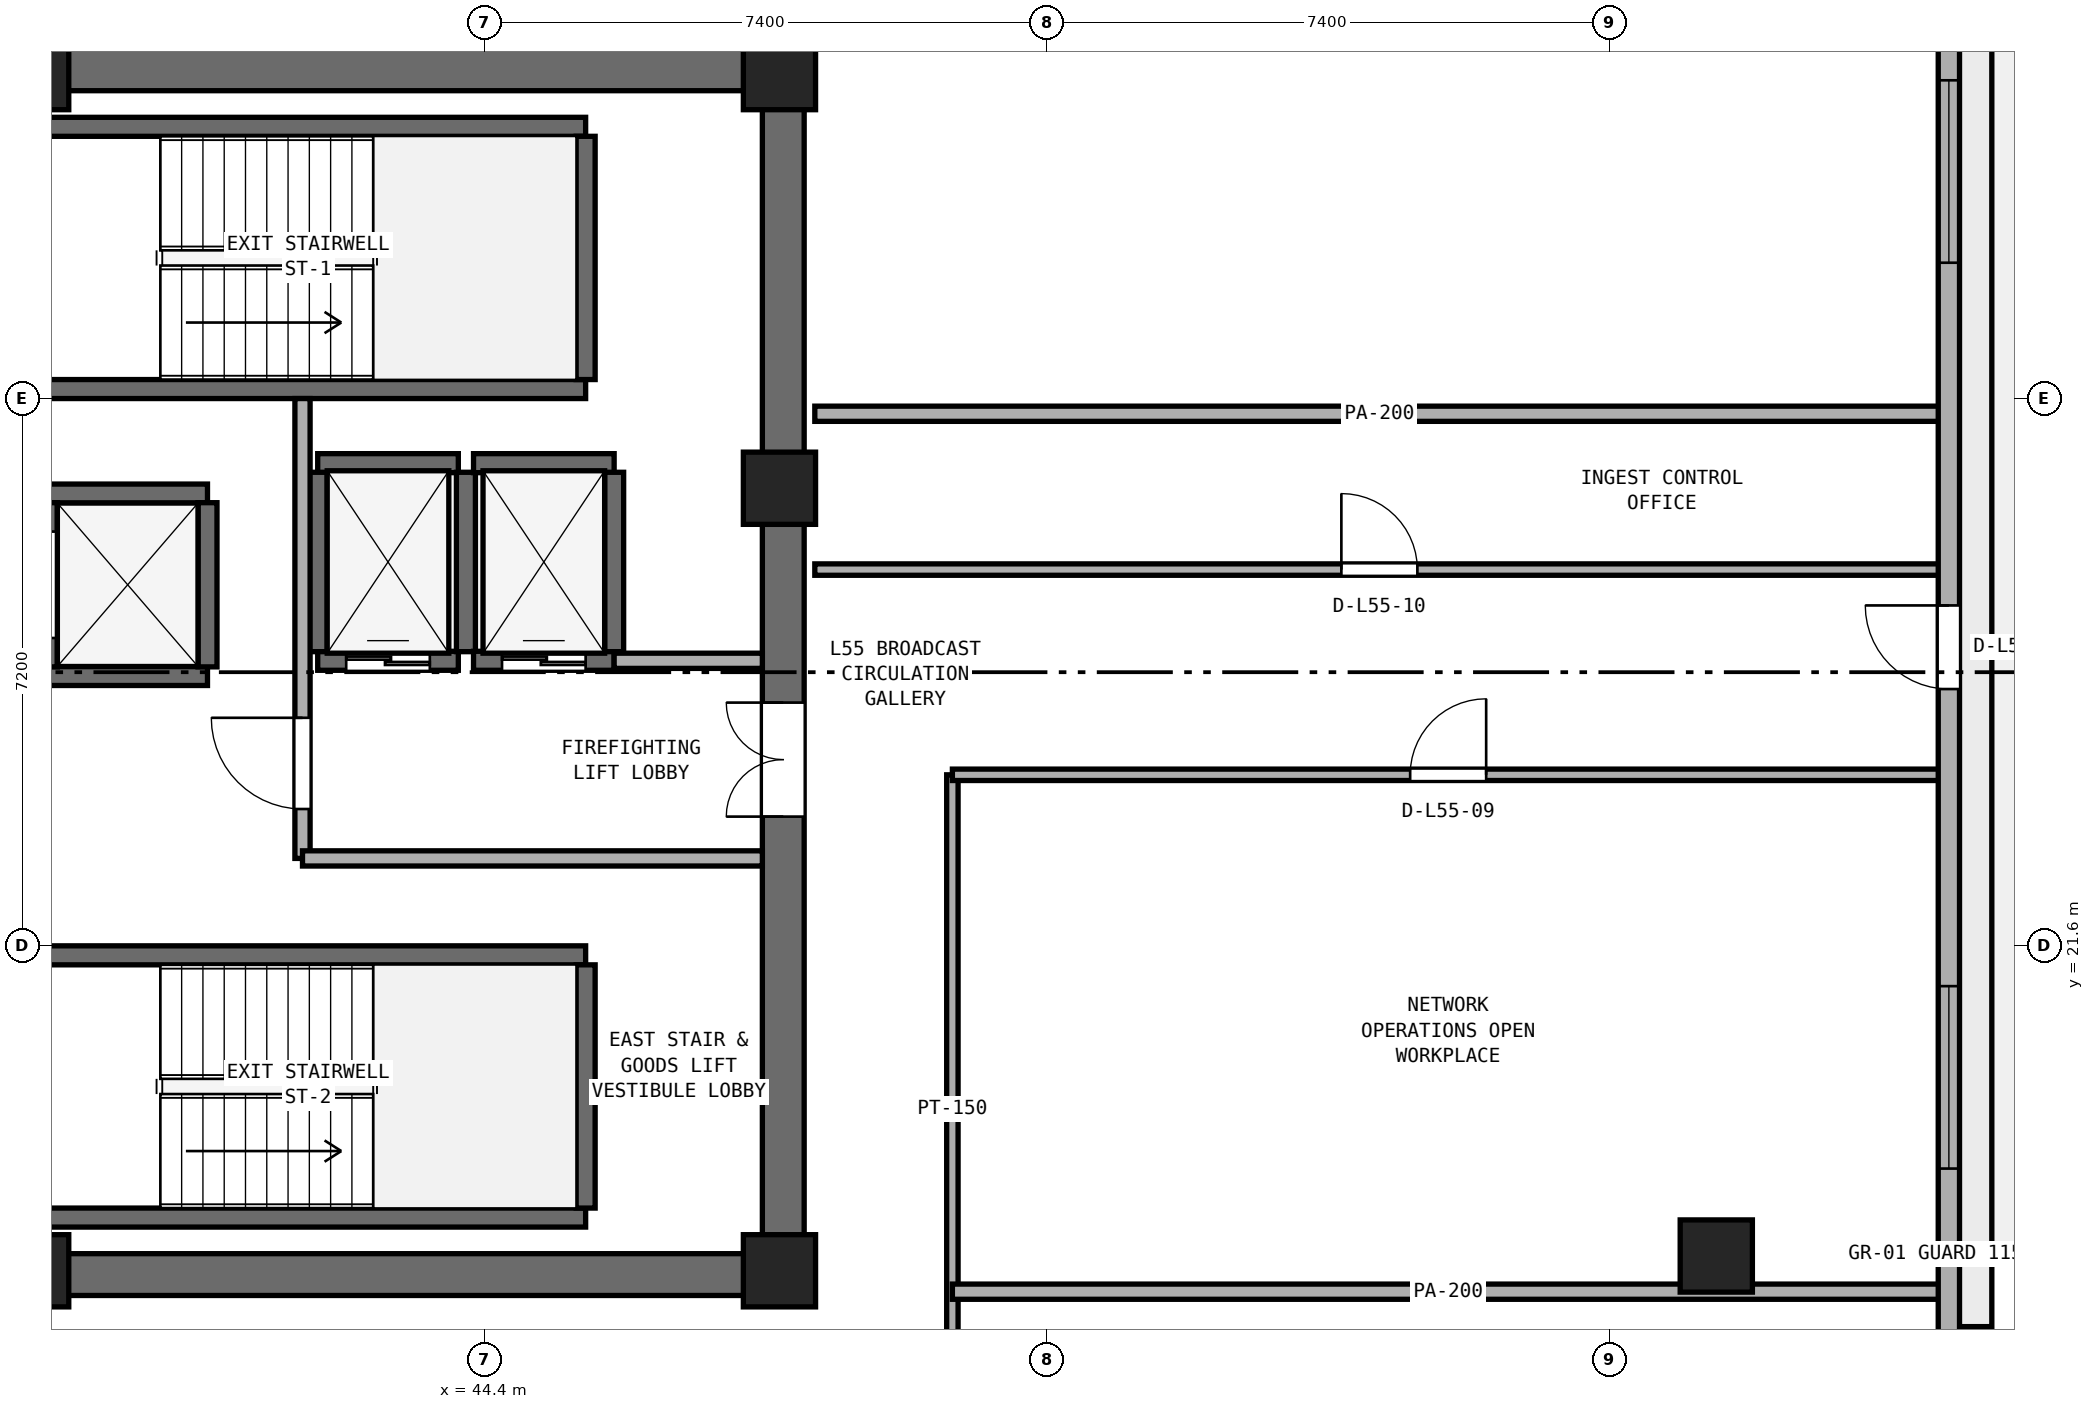
"""IFC4 building model, lengths in metres.
Left out: names, types, materials, properties, quantities, classifications, styles, units other than length and angle.
Written with IfcOpenShell. Run it as: python <this file> out.ifc"""

import sys

from ifc_helpers import new_model, si_unit, direction, frame, frame_2d, origin, origin_2d, place, context, subcontext, project, spatial, rectangle, extrude, element, fill, save


model = new_model("IFC4")
c1 = context("Model", 3, precision=1e-05, world=origin(), true_north=direction((0.0, 1.0)))
c2 = subcontext(c1, "Body", "Model", "MODEL_VIEW")
j1 = project(units=[si_unit("LENGTHUNIT", "METRE"), si_unit("PLANEANGLEUNIT", "RADIAN")], contexts=[c1])
p1 = place(None, origin())
s1 = spatial("IfcSite", under=j1, at=p1, CompositionType="ELEMENT")
p2 = place(p1, origin())
s2 = spatial("IfcBuilding", under=s1, at=p2, CompositionType="ELEMENT")
p3 = place(p2, frame((0.0, 0.0, 216.2)))
s3 = spatial("IfcBuildingStorey", under=s2, at=p3, CompositionType="ELEMENT", Elevation=216.2)
for number, where, z_axis, x_axis in (
    (1, (25.4, 17.275, 0.0), (0.0, 0.0, 1.0), (1.0, 0.0, 0.0)),
    (2, (25.4, 33.125, 0.0), (0.0, 0.0, 1.0), (1.0, 0.0, 0.0)),
):
    element("IfcWall", number, at=place(p3, frame(where, z_axis=z_axis, x_axis=x_axis)), inside=s3, PredefinedType="SHEAR", context=c2, shape_type="SweptSolid", body=[
        extrude(rectangle(XDim=23.2, YDim=0.55, at=frame_2d((11.6, 0.0))), origin(), (0.0, 0.0, 1.0), 3.4),
    ])
p4 = place(p3, frame((48.325, 17.55, 0.0), z_axis=(0.0, 0.0, 1.0), x_axis=(0.0, 1.0, 0.0)))
e3 = element("IfcWall", 3, at=p4, inside=s3, PredefinedType="SHEAR", context=c2, shape_type="SweptSolid", body=[
    extrude(rectangle(XDim=15.3, YDim=0.55, at=frame_2d((7.65, 0.0))), origin(), (0.0, 0.0, 1.0), 3.4),
])
p5 = place(p4, frame((5.75, 0.0, 0.0)))
e4 = element("IfcOpeningElement", 4, at=p5, cuts=e3, PredefinedType="OPENING", context=c2, shape_type="SweptSolid", body=[
    extrude(rectangle(XDim=1.5, YDim=2.15, at=frame_2d((0.75, 1.075))), frame((0.0, 0.285, 0.0), z_axis=(0.0, -1.0, 0.0), x_axis=(1.0, 0.0, 0.0)), (0.0, 0.0, 1.0), 0.57),
])
for number, where, z_axis, x_axis in (
    (5, (38.45, 17.325, 0.0), (0.0, 0.0, 1.0), (1.0, 0.0, 0.0)),
    (6, (48.275, 17.325, 0.0), (0.0, 0.0, 1.0), (1.0, 0.0, 0.0)),
    (7, (48.275, 27.62, 0.0), (0.0, 0.0, 1.0), (1.0, 0.0, 0.0)),
    (8, (48.275, 33.075, 0.0), (0.0, 0.0, 1.0), (1.0, 0.0, 0.0)),
    (9, (38.45, 33.075, 0.0), (0.0, 0.0, 1.0), (1.0, 0.0, 0.0)),
):
    element("IfcColumn", number, at=place(p3, frame(where, z_axis=z_axis, x_axis=x_axis)), inside=s3, PredefinedType="PILASTER", context=c2, shape_type="SweptSolid", body=[
        extrude(rectangle(XDim=0.95, YDim=0.95, at=origin_2d()), origin(), (0.0, 0.0, 1.0), 3.8),
    ])
p6 = place(p3, frame((60.6, 17.519, 0.0), z_axis=(0.0, 0.0, 1.0), x_axis=(1.0, 0.0, 0.0)))
e10 = element("IfcColumn", 10, at=p6, inside=s3, PredefinedType="COLUMN", context=c2, shape_type="SweptSolid", body=[
    extrude(rectangle(XDim=0.95, YDim=0.95, at=origin_2d()), origin(), (0.0, 0.0, 1.0), 3.8),
])
for number, where, z_axis, x_axis in (
    (11, (38.425, 28.925, 0.0), (0.0, 0.0, 1.0), (1.0, 0.0, 0.0)),
    (12, (38.425, 32.375, 0.0), (0.0, 0.0, 1.0), (1.0, 0.0, 0.0)),
):
    element("IfcWall", number, at=place(p3, frame(where, z_axis=z_axis, x_axis=x_axis)), inside=s3, PredefinedType="SHEAR", context=c2, shape_type="SweptSolid", body=[
        extrude(rectangle(XDim=7.3, YDim=0.25, at=frame_2d((3.65, 0.0))), origin(), (0.0, 0.0, 1.0), 3.4),
    ])
p7 = place(p3, frame((45.725, 29.05, 0.0), z_axis=(0.0, 0.0, 1.0), x_axis=(0.0, 1.0, 0.0)))
e13 = element("IfcWall", 13, at=p7, inside=s3, PredefinedType="SHEAR", context=c2, shape_type="SweptSolid", body=[
    extrude(rectangle(XDim=3.2, YDim=0.25, at=frame_2d((1.6, 0.0))), origin(), (0.0, 0.0, 1.0), 3.4),
])
for number, where, z_axis, x_axis in (
    (14, (38.425, 18.025, 0.0), (0.0, 0.0, 1.0), (1.0, 0.0, 0.0)),
    (15, (38.425, 21.475, 0.0), (0.0, 0.0, 1.0), (1.0, 0.0, 0.0)),
):
    element("IfcWall", number, at=place(p3, frame(where, z_axis=z_axis, x_axis=x_axis)), inside=s3, PredefinedType="SHEAR", context=c2, shape_type="SweptSolid", body=[
        extrude(rectangle(XDim=7.3, YDim=0.25, at=frame_2d((3.65, 0.0))), origin(), (0.0, 0.0, 1.0), 3.4),
    ])
p8 = place(p3, frame((45.725, 18.15, 0.0), z_axis=(0.0, 0.0, 1.0), x_axis=(0.0, 1.0, 0.0)))
e16 = element("IfcWall", 16, at=p8, inside=s3, PredefinedType="SHEAR", context=c2, shape_type="SweptSolid", body=[
    extrude(rectangle(XDim=3.2, YDim=0.25, at=frame_2d((1.6, 0.0))), origin(), (0.0, 0.0, 1.0), 3.4),
])
p9 = place(p3, frame((42.2, 25.35, 0.0), z_axis=(0.0, 0.0, 1.0), x_axis=(1.0, 0.0, 0.0)))
e17 = element("IfcWall", 17, at=p9, inside=s3, PredefinedType="SHEAR", context=c2, shape_type="SweptSolid", body=[
    extrude(rectangle(XDim=1.85, YDim=0.25, at=frame_2d((0.925, 0.0))), origin(), (0.0, 0.0, 1.0), 3.4),
])
p10 = place(p9, frame((0.375, 0.0, 0.0)))
e18 = element("IfcOpeningElement", 18, at=p10, cuts=e17, PredefinedType="OPENING", context=c2, shape_type="SweptSolid", body=[
    extrude(rectangle(XDim=1.1, YDim=2.15, at=frame_2d((0.55, 1.075))), frame((0.0, 0.135, 0.0), z_axis=(0.0, -1.0, 0.0), x_axis=(1.0, 0.0, 0.0)), (0.0, 0.0, 1.0), 0.27),
])
p11 = place(p3, frame((42.2, 27.95, 0.0), z_axis=(0.0, 0.0, 1.0), x_axis=(1.0, 0.0, 0.0)))
e19 = element("IfcWall", 19, at=p11, inside=s3, PredefinedType="SHEAR", context=c2, shape_type="SweptSolid", body=[
    extrude(rectangle(XDim=1.85, YDim=0.25, at=frame_2d((0.925, 0.0))), origin(), (0.0, 0.0, 1.0), 3.4),
])
for number, where, z_axis, x_axis in (
    (20, (42.2, 25.47, 0.0), (0.0, 0.0, 1.0), (0.0, 1.0, 0.0)),
    (21, (44.15, 25.47, 0.0), (0.0, 0.0, 1.0), (0.0, 1.0, 0.0)),
):
    element("IfcWall", number, at=place(p3, frame(where, z_axis=z_axis, x_axis=x_axis)), inside=s3, PredefinedType="SHEAR", context=c2, shape_type="SweptSolid", body=[
        extrude(rectangle(XDim=2.36, YDim=0.25, at=frame_2d((1.18, 0.0))), origin(), (0.0, 0.0, 1.0), 3.4),
    ])
p12 = place(p3, frame((44.25, 25.35, 0.0), z_axis=(0.0, 0.0, 1.0), x_axis=(1.0, 0.0, 0.0)))
e22 = element("IfcWall", 22, at=p12, inside=s3, PredefinedType="SHEAR", context=c2, shape_type="SweptSolid", body=[
    extrude(rectangle(XDim=1.85, YDim=0.25, at=frame_2d((0.925, 0.0))), origin(), (0.0, 0.0, 1.0), 3.4),
])
p13 = place(p12, frame((0.375, 0.0, 0.0)))
e23 = element("IfcOpeningElement", 23, at=p13, cuts=e22, PredefinedType="OPENING", context=c2, shape_type="SweptSolid", body=[
    extrude(rectangle(XDim=1.1, YDim=2.15, at=frame_2d((0.55, 1.075))), frame((0.0, 0.135, 0.0), z_axis=(0.0, -1.0, 0.0), x_axis=(1.0, 0.0, 0.0)), (0.0, 0.0, 1.0), 0.27),
])
p14 = place(p3, frame((44.25, 27.95, 0.0), z_axis=(0.0, 0.0, 1.0), x_axis=(1.0, 0.0, 0.0)))
e24 = element("IfcWall", 24, at=p14, inside=s3, PredefinedType="SHEAR", context=c2, shape_type="SweptSolid", body=[
    extrude(rectangle(XDim=1.85, YDim=0.25, at=frame_2d((0.925, 0.0))), origin(), (0.0, 0.0, 1.0), 3.4),
])
p15 = place(p3, frame((46.1, 25.47, 0.0), z_axis=(0.0, 0.0, 1.0), x_axis=(0.0, 1.0, 0.0)))
e25 = element("IfcWall", 25, at=p15, inside=s3, PredefinedType="SHEAR", context=c2, shape_type="SweptSolid", body=[
    extrude(rectangle(XDim=2.36, YDim=0.25, at=frame_2d((1.18, 0.0))), origin(), (0.0, 0.0, 1.0), 3.4),
])
for number, where, z_axis, x_axis in (
    (26, (38.65, 25.15, 0.0), (0.0, 0.0, 1.0), (1.0, 0.0, 0.0)),
    (27, (38.65, 27.55, 0.0), (0.0, 0.0, 1.0), (1.0, 0.0, 0.0)),
):
    element("IfcWall", number, at=place(p3, frame(where, z_axis=z_axis, x_axis=x_axis)), inside=s3, PredefinedType="SHEAR", context=c2, shape_type="SweptSolid", body=[
        extrude(rectangle(XDim=2.1, YDim=0.25, at=frame_2d((1.05, 0.0))), origin(), (0.0, 0.0, 1.0), 3.4),
    ])
p16 = place(p3, frame((38.65, 25.27, 0.0), z_axis=(0.0, 0.0, 1.0), x_axis=(0.0, 1.0, 0.0)))
e28 = element("IfcWall", 28, at=p16, inside=s3, PredefinedType="SHEAR", context=c2, shape_type="SweptSolid", body=[
    extrude(rectangle(XDim=2.16, YDim=0.25, at=frame_2d((1.08, 0.0))), origin(), (0.0, 0.0, 1.0), 3.4),
])
p17 = place(p16, frame((0.38, 0.0, 0.0)))
e29 = element("IfcOpeningElement", 29, at=p17, cuts=e28, PredefinedType="OPENING", context=c2, shape_type="SweptSolid", body=[
    extrude(rectangle(XDim=1.4, YDim=2.2, at=frame_2d((0.7, 1.1))), frame((0.0, 0.135, 0.0), z_axis=(0.0, -1.0, 0.0), x_axis=(1.0, 0.0, 0.0)), (0.0, 0.0, 1.0), 0.27),
])
p18 = place(p3, frame((40.75, 25.27, 0.0), z_axis=(0.0, 0.0, 1.0), x_axis=(0.0, 1.0, 0.0)))
e30 = element("IfcWall", 30, at=p18, inside=s3, PredefinedType="SHEAR", context=c2, shape_type="SweptSolid", body=[
    extrude(rectangle(XDim=2.16, YDim=0.25, at=frame_2d((1.08, 0.0))), origin(), (0.0, 0.0, 1.0), 3.4),
])
p19 = place(p3, frame((42.0, 22.75, 0.0), z_axis=(0.0, 0.0, 1.0), x_axis=(0.0, 1.0, 0.0)))
e31 = element("IfcWall", 31, at=p19, inside=s3, PredefinedType="SOLIDWALL", context=c2, shape_type="SweptSolid", body=[
    extrude(rectangle(XDim=6.05, YDim=0.2, at=frame_2d((3.025, 0.0))), origin(), (0.0, 0.0, 1.0), 3.4),
])
p20 = place(p19, frame((0.65, 0.0, 0.0)))
e32 = element("IfcOpeningElement", 32, at=p20, cuts=e31, PredefinedType="OPENING", context=c2, shape_type="SweptSolid", body=[
    extrude(rectangle(XDim=1.2, YDim=2.15, at=frame_2d((0.6, 1.075))), frame((0.0, 0.11, 0.0), z_axis=(0.0, -1.0, 0.0), x_axis=(1.0, 0.0, 0.0)), (0.0, 0.0, 1.0), 0.22),
])
p21 = place(p3, frame((42.0, 22.75, 0.0), z_axis=(0.0, 0.0, 1.0), x_axis=(1.0, 0.0, 0.0)))
e33 = element("IfcWall", 33, at=p21, inside=s3, PredefinedType="SOLIDWALL", context=c2, shape_type="SweptSolid", body=[
    extrude(rectangle(XDim=6.05, YDim=0.2, at=frame_2d((3.025, 0.0))), origin(), (0.0, 0.0, 1.0), 3.4),
])
p22 = place(p3, frame((46.1, 25.35, 0.0), z_axis=(0.0, 0.0, 1.0), x_axis=(1.0, 0.0, 0.0)))
e34 = element("IfcWall", 34, at=p22, inside=s3, PredefinedType="SOLIDWALL", context=c2, shape_type="SweptSolid", body=[
    extrude(rectangle(XDim=1.95, YDim=0.2, at=frame_2d((0.975, 0.0))), origin(), (0.0, 0.0, 1.0), 3.4),
])
p23 = place(p3, frame((50.55, 15.05, 0.0), z_axis=(0.0, 0.0, 1.0), x_axis=(0.0, 1.0, 0.0)))
e35 = element("IfcWall", 35, at=p23, inside=s3, PredefinedType="PARTITIONING", context=c2, shape_type="SweptSolid", body=[
    extrude(rectangle(XDim=8.8, YDim=0.15, at=frame_2d((4.4, 0.0))), origin(), (0.0, 0.0, 1.0), 3.4),
])
p24 = place(p3, frame((50.55, 17.05, 0.0), z_axis=(0.0, 0.0, 1.0), x_axis=(1.0, 0.0, 0.0)))
e36 = element("IfcWall", 36, at=p24, inside=s3, PredefinedType="PARTITIONING", context=c2, shape_type="SweptSolid", body=[
    extrude(rectangle(XDim=13.045, YDim=0.2, at=frame_2d((6.522, 0.0))), origin(), (0.0, 0.0, 1.0), 3.4),
])
p25 = place(p3, frame((50.55, 23.85, 0.0), z_axis=(0.0, 0.0, 1.0), x_axis=(1.0, 0.0, 0.0)))
e37 = element("IfcWall", 37, at=p25, inside=s3, PredefinedType="PARTITIONING", context=c2, shape_type="SweptSolid", body=[
    extrude(rectangle(XDim=13.045, YDim=0.15, at=frame_2d((6.522, 0.0))), origin(), (0.0, 0.0, 1.0), 3.4),
])
p26 = place(p25, frame((6.022, 0.0, 0.0)))
e38 = element("IfcOpeningElement", 38, at=p26, cuts=e37, PredefinedType="OPENING", context=c2, shape_type="SweptSolid", body=[
    extrude(rectangle(XDim=1.0, YDim=2.12, at=frame_2d((0.5, 1.06))), frame((0.0, 0.085, 0.0), z_axis=(0.0, -1.0, 0.0), x_axis=(1.0, 0.0, 0.0)), (0.0, 0.0, 1.0), 0.17),
])
p27 = place(p3, frame((48.74, 26.55, 0.0), z_axis=(0.0, 0.0, 1.0), x_axis=(1.0, 0.0, 0.0)))
e39 = element("IfcWall", 39, at=p27, inside=s3, PredefinedType="PARTITIONING", context=c2, shape_type="SweptSolid", body=[
    extrude(rectangle(XDim=14.855, YDim=0.15, at=frame_2d((7.427, 0.0))), origin(), (0.0, 0.0, 1.0), 3.4),
])
p28 = place(p27, frame((6.927, 0.0, 0.0)))
e40 = element("IfcOpeningElement", 40, at=p28, cuts=e39, PredefinedType="OPENING", context=c2, shape_type="SweptSolid", body=[
    extrude(rectangle(XDim=1.0, YDim=2.12, at=frame_2d((0.5, 1.06))), frame((0.0, 0.085, 0.0), z_axis=(0.0, -1.0, 0.0), x_axis=(1.0, 0.0, 0.0)), (0.0, 0.0, 1.0), 0.17),
])
p29 = place(p3, frame((48.74, 28.6, 0.0), z_axis=(0.0, 0.0, 1.0), x_axis=(1.0, 0.0, 0.0)))
e41 = element("IfcWall", 41, at=p29, inside=s3, PredefinedType="PARTITIONING", context=c2, shape_type="SweptSolid", body=[
    extrude(rectangle(XDim=14.855, YDim=0.2, at=frame_2d((7.427, 0.0))), origin(), (0.0, 0.0, 1.0), 3.4),
])
p30 = place(p3, frame((63.66, 16.39, 0.0), z_axis=(0.0, 0.0, 1.0), x_axis=(0.0, 1.0, 0.0)))
e42 = element("IfcWall", 42, at=p30, inside=s3, PredefinedType="STANDARD", context=c2, shape_type="SweptSolid", body=[
    extrude(rectangle(XDim=18.876, YDim=0.28, at=frame_2d((9.438, 0.0))), origin(), (0.0, 0.0, 1.0), 3.4),
])
p31 = place(p30, frame((8.588, 0.0, 0.0)))
e43 = element("IfcOpeningElement", 43, at=p31, cuts=e42, PredefinedType="OPENING", context=c2, shape_type="SweptSolid", body=[
    extrude(rectangle(XDim=1.1, YDim=2.2, at=frame_2d((0.55, 1.1))), frame((0.0, 0.15, 0.0), z_axis=(0.0, -1.0, 0.0), x_axis=(1.0, 0.0, 0.0)), (0.0, 0.0, 1.0), 0.3),
])
p32 = place(p30, frame((2.279, 0.0, 0.9)))
e44 = element("IfcOpeningElement", 44, at=p32, cuts=e42, PredefinedType="OPENING", context=c2, shape_type="SweptSolid", body=[
    extrude(rectangle(XDim=2.4, YDim=1.75, at=frame_2d((1.2, 0.875))), frame((0.0, 0.15, 0.0), z_axis=(0.0, -1.0, 0.0), x_axis=(1.0, 0.0, 0.0)), (0.0, 0.0, 1.0), 0.3),
])
p33 = place(p30, frame((14.197, 0.0, 0.9)))
e45 = element("IfcOpeningElement", 45, at=p33, cuts=e42, PredefinedType="OPENING", context=c2, shape_type="SweptSolid", body=[
    extrude(rectangle(XDim=2.4, YDim=1.75, at=frame_2d((1.2, 0.875))), frame((0.0, 0.15, 0.0), z_axis=(0.0, -1.0, 0.0), x_axis=(1.0, 0.0, 0.0)), (0.0, 0.0, 1.0), 0.3),
])
p34 = place(p10, origin())
e46 = element("IfcDoor", 46, at=p34, inside=s3, OperationType="DOUBLE_DOOR_SLIDING", PredefinedType="DOOR", context=c2, shape_type="SweptSolid", body=[
    extrude(rectangle(XDim=1.1, YDim=2.15, at=frame_2d((0.55, 1.075))), frame((0.0, 0.025, 0.0), z_axis=(0.0, -1.0, 0.0), x_axis=(1.0, 0.0, 0.0)), (0.0, 0.0, 1.0), 0.05),
])
fill(e18, e46)
p35 = place(p13, origin())
e47 = element("IfcDoor", 47, at=p35, inside=s3, OperationType="DOUBLE_DOOR_SLIDING", PredefinedType="DOOR", context=c2, shape_type="SweptSolid", body=[
    extrude(rectangle(XDim=1.1, YDim=2.15, at=frame_2d((0.55, 1.075))), frame((0.0, 0.025, 0.0), z_axis=(0.0, -1.0, 0.0), x_axis=(1.0, 0.0, 0.0)), (0.0, 0.0, 1.0), 0.05),
])
fill(e23, e47)
p36 = place(p20, origin())
e48 = element("IfcDoor", 48, at=p36, inside=s3, OperationType="SINGLE_SWING_RIGHT", PredefinedType="DOOR", context=c2, shape_type="SweptSolid", body=[
    extrude(rectangle(XDim=1.2, YDim=2.15, at=frame_2d((0.6, 1.075))), frame((0.0, 0.025, 0.0), z_axis=(0.0, -1.0, 0.0), x_axis=(1.0, 0.0, 0.0)), (0.0, 0.0, 1.0), 0.05),
])
fill(e32, e48)
p37 = place(p5, origin())
e49 = element("IfcDoor", 49, at=p37, inside=s3, OperationType="DOUBLE_DOOR_SINGLE_SWING", PredefinedType="DOOR", context=c2, shape_type="SweptSolid", body=[
    extrude(rectangle(XDim=1.5, YDim=2.15, at=frame_2d((0.75, 1.075))), frame((0.0, 0.025, 0.0), z_axis=(0.0, -1.0, 0.0), x_axis=(1.0, 0.0, 0.0)), (0.0, 0.0, 1.0), 0.05),
])
fill(e4, e49)
p38 = place(p26, origin())
e50 = element("IfcDoor", 50, at=p38, inside=s3, OperationType="SINGLE_SWING_RIGHT", PredefinedType="DOOR", context=c2, shape_type="SweptSolid", body=[
    extrude(rectangle(XDim=1.0, YDim=2.12, at=frame_2d((0.5, 1.06))), frame((0.0, 0.025, 0.0), z_axis=(0.0, -1.0, 0.0), x_axis=(1.0, 0.0, 0.0)), (0.0, 0.0, 1.0), 0.05),
])
fill(e38, e50)
p39 = place(p28, origin())
e51 = element("IfcDoor", 51, at=p39, inside=s3, OperationType="SINGLE_SWING_LEFT", PredefinedType="DOOR", context=c2, shape_type="SweptSolid", body=[
    extrude(rectangle(XDim=1.0, YDim=2.12, at=frame_2d((0.5, 1.06))), frame((0.0, 0.025, 0.0), z_axis=(0.0, -1.0, 0.0), x_axis=(1.0, 0.0, 0.0)), (0.0, 0.0, 1.0), 0.05),
])
fill(e40, e51)
p40 = place(p31, origin())
e52 = element("IfcDoor", 52, at=p40, inside=s3, OperationType="SINGLE_SWING_RIGHT", PredefinedType="DOOR", context=c2, shape_type="SweptSolid", body=[
    extrude(rectangle(XDim=1.1, YDim=2.2, at=frame_2d((0.55, 1.1))), frame((0.0, 0.025, 0.0), z_axis=(0.0, -1.0, 0.0), x_axis=(1.0, 0.0, 0.0)), (0.0, 0.0, 1.0), 0.05),
])
fill(e43, e52)
p41 = place(p32, origin())
e53 = element("IfcWindow", 53, at=p41, inside=s3, PartitioningType="SINGLE_PANEL", PredefinedType="WINDOW", context=c2, shape_type="SweptSolid", body=[
    extrude(rectangle(XDim=2.4, YDim=1.75, at=frame_2d((1.2, 0.875))), frame((0.0, 0.03, 0.0), z_axis=(0.0, -1.0, 0.0), x_axis=(1.0, 0.0, 0.0)), (0.0, 0.0, 1.0), 0.06),
])
fill(e44, e53)
p42 = place(p33, origin())
e54 = element("IfcWindow", 54, at=p42, inside=s3, PartitioningType="SINGLE_PANEL", PredefinedType="WINDOW", context=c2, shape_type="SweptSolid", body=[
    extrude(rectangle(XDim=2.4, YDim=1.75, at=frame_2d((1.2, 0.875))), frame((0.0, 0.03, 0.0), z_axis=(0.0, -1.0, 0.0), x_axis=(1.0, 0.0, 0.0)), (0.0, 0.0, 1.0), 0.06),
])
fill(e45, e54)
save(model, sys.argv[1])
